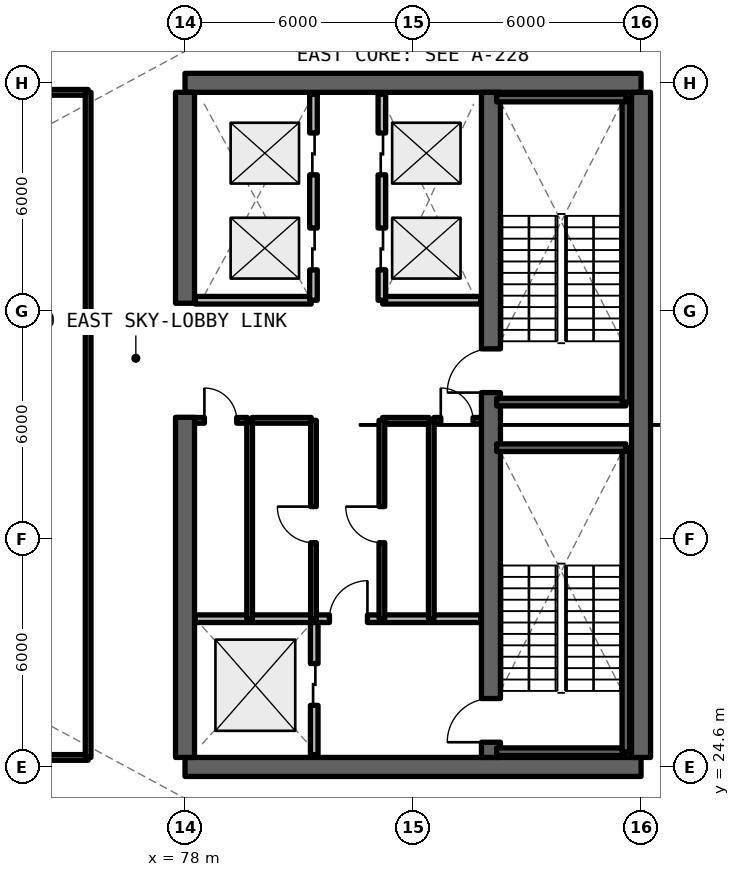
"""IFC4 building model, lengths in metres.
Left out: names, types, materials, properties, quantities, classifications, styles, units other than length and angle.
Written with IfcOpenShell. Run it as: python <this file> out.ifc"""

import sys

from ifc_helpers import new_model, si_unit, direction, frame, frame_2d, origin, place, context, subcontext, project, spatial, rectangle, extrude, element, fill, save


model = new_model("IFC4")
c1 = context("Model", 3, precision=1e-05, world=origin(), true_north=direction((0.0, 1.0)))
c2 = subcontext(c1, "Body", "Model", "MODEL_VIEW")
j1 = project(units=[si_unit("LENGTHUNIT", "METRE"), si_unit("PLANEANGLEUNIT", "RADIAN")], contexts=[c1])
p1 = place(None, origin())
s1 = spatial("IfcSite", under=j1, at=p1, CompositionType="ELEMENT")
p2 = place(p1, origin())
s2 = spatial("IfcBuilding", under=s1, at=p2, CompositionType="ELEMENT")
p3 = place(p2, frame((0.0, 0.0, 128.04)))
s3 = spatial("IfcBuildingStorey", under=s2, at=p3, CompositionType="ELEMENT", Elevation=128.04)
for number, where, z_axis, x_axis in (
    (1, (78.0, 24.6, 0.0), (0.0, 0.0, 1.0), (1.0, 0.0, 0.0)),
    (2, (90.0, 42.6, 0.0), (0.0, 0.0, 1.0), (-1.0, 0.0, 0.0)),
):
    element("IfcWall", number, at=place(p3, frame(where, z_axis=z_axis, x_axis=x_axis)), inside=s3, PredefinedType="SHEAR", context=c2, shape_type="SweptSolid", body=[
        extrude(rectangle(XDim=12.0, YDim=0.5, at=frame_2d((6.0, 0.0))), origin(), (0.0, 0.0, 1.0), 3.96),
    ])
p4 = place(p3, frame((90.0, 24.85, 0.0), z_axis=(0.0, 0.0, 1.0), x_axis=(0.0, 1.0, 0.0)))
e3 = element("IfcWall", 3, at=p4, inside=s3, PredefinedType="SHEAR", context=c2, shape_type="SweptSolid", body=[
    extrude(rectangle(XDim=17.5, YDim=0.5, at=frame_2d((8.75, 0.0))), origin(), (0.0, 0.0, 1.0), 3.96),
])
p5 = place(p3, frame((78.0, 24.85, 0.0), z_axis=(0.0, 0.0, 1.0), x_axis=(0.0, 1.0, 0.0)))
e4 = element("IfcWall", 4, at=p5, inside=s3, PredefinedType="SHEAR", context=c2, shape_type="SweptSolid", body=[
    extrude(rectangle(XDim=8.95, YDim=0.5, at=frame_2d((4.475, 0.0))), origin(), (0.0, 0.0, 1.0), 3.96),
])
p6 = place(p3, frame((78.0, 36.8, 0.0), z_axis=(0.0, 0.0, 1.0), x_axis=(0.0, 1.0, 0.0)))
e5 = element("IfcWall", 5, at=p6, inside=s3, PredefinedType="SHEAR", context=c2, shape_type="SweptSolid", body=[
    extrude(rectangle(XDim=5.55, YDim=0.5, at=frame_2d((2.775, 0.0))), origin(), (0.0, 0.0, 1.0), 3.96),
])
p7 = place(p3, frame((86.05, 24.85, 0.0), z_axis=(0.0, 0.0, 1.0), x_axis=(0.0, 1.0, 0.0)))
e6 = element("IfcWall", 6, at=p7, inside=s3, PredefinedType="SHEAR", context=c2, shape_type="SweptSolid", body=[
    extrude(rectangle(XDim=17.5, YDim=0.5, at=frame_2d((8.75, 0.0))), origin(), (0.0, 0.0, 1.0), 3.96),
])
p8 = place(p7, frame((0.4, 0.0, 0.0)))
e7 = element("IfcOpeningElement", 7, at=p8, cuts=e6, PredefinedType="OPENING", context=c2, shape_type="SweptSolid", body=[
    extrude(rectangle(XDim=1.15, YDim=2.15, at=frame_2d((0.575, 1.075))), frame((0.0, 0.26, 0.0), z_axis=(0.0, -1.0, 0.0), x_axis=(1.0, 0.0, 0.0)), (0.0, 0.0, 1.0), 0.52),
])
p9 = place(p7, frame((9.6, 0.0, 0.0)))
e8 = element("IfcOpeningElement", 8, at=p9, cuts=e6, PredefinedType="OPENING", context=c2, shape_type="SweptSolid", body=[
    extrude(rectangle(XDim=1.15, YDim=2.15, at=frame_2d((0.575, 1.075))), frame((0.0, 0.26, 0.0), z_axis=(0.0, -1.0, 0.0), x_axis=(1.0, 0.0, 0.0)), (0.0, 0.0, 1.0), 0.52),
])
p10 = place(p3, frame((81.4, 24.92, 0.0), z_axis=(0.0, 0.0, 1.0), x_axis=(0.0, 1.0, 0.0)))
e9 = element("IfcWall", 9, at=p10, inside=s3, PredefinedType="SOLIDWALL", context=c2, shape_type="SweptSolid", body=[
    extrude(rectangle(XDim=3.58, YDim=0.2, at=frame_2d((1.79, 0.0))), origin(), (0.0, 0.0, 1.0), 2.96),
])
p11 = place(p10, frame((1.3, 0.0, 0.0)))
e10 = element("IfcOpeningElement", 10, at=p11, cuts=e9, PredefinedType="OPENING", context=c2, shape_type="SweptSolid", body=[
    extrude(rectangle(XDim=1.1, YDim=2.2, at=frame_2d((0.55, 1.1))), frame((0.0, 0.11, 0.0), z_axis=(0.0, -1.0, 0.0), x_axis=(1.0, 0.0, 0.0)), (0.0, 0.0, 1.0), 0.22),
])
p12 = place(p3, frame((78.27, 28.5, 0.0), z_axis=(0.0, 0.0, 1.0), x_axis=(1.0, 0.0, 0.0)))
e11 = element("IfcWall", 11, at=p12, inside=s3, PredefinedType="SOLIDWALL", context=c2, shape_type="SweptSolid", body=[
    extrude(rectangle(XDim=7.51, YDim=0.2, at=frame_2d((3.755, 0.0))), origin(), (0.0, 0.0, 1.0), 2.96),
])
p13 = place(p12, frame((3.53, 0.0, 0.0)))
e12 = element("IfcOpeningElement", 12, at=p13, cuts=e11, PredefinedType="OPENING", context=c2, shape_type="SweptSolid", body=[
    extrude(rectangle(XDim=1.0, YDim=2.15, at=frame_2d((0.5, 1.075))), frame((0.0, 0.11, 0.0), z_axis=(0.0, -1.0, 0.0), x_axis=(1.0, 0.0, 0.0)), (0.0, 0.0, 1.0), 0.22),
])
p14 = place(p3, frame((84.48, 28.5, 0.0), z_axis=(0.0, 0.0, 1.0), x_axis=(0.0, 1.0, 0.0)))
e13 = element("IfcWall", 13, at=p14, inside=s3, PredefinedType="SOLIDWALL", context=c2, shape_type="SweptSolid", body=[
    extrude(rectangle(XDim=5.22, YDim=0.15, at=frame_2d((2.61, 0.0))), origin(), (0.0, 0.0, 1.0), 2.96),
])
p15 = place(p3, frame((84.55, 33.72, 0.0), z_axis=(0.0, 0.0, 1.0), x_axis=(1.0, 0.0, 0.0)))
e14 = element("IfcWall", 14, at=p15, inside=s3, PredefinedType="SOLIDWALL", context=c2, shape_type="SweptSolid", body=[
    extrude(rectangle(XDim=1.23, YDim=0.15, at=frame_2d((0.615, 0.0))), origin(), (0.0, 0.0, 1.0), 2.96),
])
p16 = place(p15, frame((0.18, 0.0, 0.0)))
e15 = element("IfcOpeningElement", 15, at=p16, cuts=e14, PredefinedType="OPENING", context=c2, shape_type="SweptSolid", body=[
    extrude(rectangle(XDim=0.85, YDim=2.1, at=frame_2d((0.425, 1.05))), frame((0.0, 0.085, 0.0), z_axis=(0.0, -1.0, 0.0), x_axis=(1.0, 0.0, 0.0)), (0.0, 0.0, 1.0), 0.17),
])
p17 = place(p3, frame((83.2, 33.72, 0.0), z_axis=(0.0, 0.0, 1.0), x_axis=(1.0, 0.0, 0.0)))
e16 = element("IfcWall", 16, at=p17, inside=s3, PredefinedType="SOLIDWALL", context=c2, shape_type="SweptSolid", body=[
    extrude(rectangle(XDim=1.22, YDim=0.15, at=frame_2d((0.61, 0.0))), origin(), (0.0, 0.0, 1.0), 2.96),
])
p18 = place(p3, frame((83.18, 28.5, 0.0), z_axis=(0.0, 0.0, 1.0), x_axis=(0.0, 1.0, 0.0)))
e17 = element("IfcWall", 17, at=p18, inside=s3, PredefinedType="SOLIDWALL", context=c2, shape_type="SweptSolid", body=[
    extrude(rectangle(XDim=5.22, YDim=0.15, at=frame_2d((2.61, 0.0))), origin(), (0.0, 0.0, 1.0), 2.96),
])
p19 = place(p18, frame((2.0, 0.0, 0.0)))
e18 = element("IfcOpeningElement", 18, at=p19, cuts=e17, PredefinedType="OPENING", context=c2, shape_type="SweptSolid", body=[
    extrude(rectangle(XDim=0.95, YDim=2.15, at=frame_2d((0.475, 1.075))), frame((0.0, 0.085, 0.0), z_axis=(0.0, -1.0, 0.0), x_axis=(1.0, 0.0, 0.0)), (0.0, 0.0, 1.0), 0.17),
])
p20 = place(p3, frame((79.7, 28.5, 0.0), z_axis=(0.0, 0.0, 1.0), x_axis=(0.0, 1.0, 0.0)))
e19 = element("IfcWall", 19, at=p20, inside=s3, PredefinedType="SOLIDWALL", context=c2, shape_type="SweptSolid", body=[
    extrude(rectangle(XDim=5.22, YDim=0.15, at=frame_2d((2.61, 0.0))), origin(), (0.0, 0.0, 1.0), 2.96),
])
p21 = place(p3, frame((79.76, 33.72, 0.0), z_axis=(0.0, 0.0, 1.0), x_axis=(1.0, 0.0, 0.0)))
e20 = element("IfcWall", 20, at=p21, inside=s3, PredefinedType="SOLIDWALL", context=c2, shape_type="SweptSolid", body=[
    extrude(rectangle(XDim=1.56, YDim=0.15, at=frame_2d((0.78, 0.0))), origin(), (0.0, 0.0, 1.0), 2.96),
])
p22 = place(p3, frame((78.27, 33.72, 0.0), z_axis=(0.0, 0.0, 1.0), x_axis=(1.0, 0.0, 0.0)))
e21 = element("IfcWall", 21, at=p22, inside=s3, PredefinedType="SOLIDWALL", context=c2, shape_type="SweptSolid", body=[
    extrude(rectangle(XDim=1.37, YDim=0.15, at=frame_2d((0.685, 0.0))), origin(), (0.0, 0.0, 1.0), 2.96),
])
p23 = place(p22, frame((0.24, 0.0, 0.0)))
e22 = element("IfcOpeningElement", 22, at=p23, cuts=e21, PredefinedType="OPENING", context=c2, shape_type="SweptSolid", body=[
    extrude(rectangle(XDim=0.85, YDim=2.1, at=frame_2d((0.425, 1.05))), frame((0.0, 0.085, 0.0), z_axis=(0.0, -1.0, 0.0), x_axis=(1.0, 0.0, 0.0)), (0.0, 0.0, 1.0), 0.17),
])
p24 = place(p3, frame((81.38, 28.5, 0.0), z_axis=(0.0, 0.0, 1.0), x_axis=(0.0, 1.0, 0.0)))
e23 = element("IfcWall", 23, at=p24, inside=s3, PredefinedType="SOLIDWALL", context=c2, shape_type="SweptSolid", body=[
    extrude(rectangle(XDim=5.22, YDim=0.15, at=frame_2d((2.61, 0.0))), origin(), (0.0, 0.0, 1.0), 2.96),
])
p25 = place(p24, frame((2.0, 0.0, 0.0)))
e24 = element("IfcOpeningElement", 24, at=p25, cuts=e23, PredefinedType="OPENING", context=c2, shape_type="SweptSolid", body=[
    extrude(rectangle(XDim=0.95, YDim=2.15, at=frame_2d((0.475, 1.075))), frame((0.0, 0.085, 0.0), z_axis=(0.0, -1.0, 0.0), x_axis=(1.0, 0.0, 0.0)), (0.0, 0.0, 1.0), 0.17),
])
p26 = place(p3, frame((83.2, 36.88, 0.0), z_axis=(0.0, 0.0, 1.0), x_axis=(1.0, 0.0, 0.0)))
e25 = element("IfcWall", 25, at=p26, inside=s3, PredefinedType="SOLIDWALL", context=c2, shape_type="SweptSolid", body=[
    extrude(rectangle(XDim=2.58, YDim=0.2, at=frame_2d((1.29, 0.0))), origin(), (0.0, 0.0, 1.0), 2.96),
])
p27 = place(p3, frame((83.18, 36.88, 0.0), z_axis=(0.0, 0.0, 1.0), x_axis=(0.0, 1.0, 0.0)))
e26 = element("IfcWall", 26, at=p27, inside=s3, PredefinedType="SOLIDWALL", context=c2, shape_type="SweptSolid", body=[
    extrude(rectangle(XDim=5.42, YDim=0.2, at=frame_2d((2.71, 0.0))), origin(), (0.0, 0.0, 1.0), 2.96),
])
p28 = place(p27, frame((0.8, 0.0, 0.0)))
e27 = element("IfcOpeningElement", 27, at=p28, cuts=e26, PredefinedType="OPENING", context=c2, shape_type="SweptSolid", body=[
    extrude(rectangle(XDim=1.1, YDim=2.2, at=frame_2d((0.55, 1.1))), frame((0.0, 0.11, 0.0), z_axis=(0.0, -1.0, 0.0), x_axis=(1.0, 0.0, 0.0)), (0.0, 0.0, 1.0), 0.22),
])
p29 = place(p27, frame((3.3, 0.0, 0.0)))
e28 = element("IfcOpeningElement", 28, at=p29, cuts=e26, PredefinedType="OPENING", context=c2, shape_type="SweptSolid", body=[
    extrude(rectangle(XDim=1.1, YDim=2.2, at=frame_2d((0.55, 1.1))), frame((0.0, 0.11, 0.0), z_axis=(0.0, -1.0, 0.0), x_axis=(1.0, 0.0, 0.0)), (0.0, 0.0, 1.0), 0.22),
])
p30 = place(p3, frame((78.27, 36.88, 0.0), z_axis=(0.0, 0.0, 1.0), x_axis=(1.0, 0.0, 0.0)))
e29 = element("IfcWall", 29, at=p30, inside=s3, PredefinedType="SOLIDWALL", context=c2, shape_type="SweptSolid", body=[
    extrude(rectangle(XDim=3.05, YDim=0.2, at=frame_2d((1.525, 0.0))), origin(), (0.0, 0.0, 1.0), 2.96),
])
p31 = place(p3, frame((81.38, 36.88, 0.0), z_axis=(0.0, 0.0, 1.0), x_axis=(0.0, 1.0, 0.0)))
e30 = element("IfcWall", 30, at=p31, inside=s3, PredefinedType="SOLIDWALL", context=c2, shape_type="SweptSolid", body=[
    extrude(rectangle(XDim=5.42, YDim=0.2, at=frame_2d((2.71, 0.0))), origin(), (0.0, 0.0, 1.0), 2.96),
])
p32 = place(p31, frame((0.8, 0.0, 0.0)))
e31 = element("IfcOpeningElement", 31, at=p32, cuts=e30, PredefinedType="OPENING", context=c2, shape_type="SweptSolid", body=[
    extrude(rectangle(XDim=1.1, YDim=2.2, at=frame_2d((0.55, 1.1))), frame((0.0, 0.11, 0.0), z_axis=(0.0, -1.0, 0.0), x_axis=(1.0, 0.0, 0.0)), (0.0, 0.0, 1.0), 0.22),
])
p33 = place(p31, frame((3.3, 0.0, 0.0)))
e32 = element("IfcOpeningElement", 32, at=p33, cuts=e30, PredefinedType="OPENING", context=c2, shape_type="SweptSolid", body=[
    extrude(rectangle(XDim=1.1, YDim=2.2, at=frame_2d((0.55, 1.1))), frame((0.0, 0.11, 0.0), z_axis=(0.0, -1.0, 0.0), x_axis=(1.0, 0.0, 0.0)), (0.0, 0.0, 1.0), 0.22),
])
for number, where, z_axis, x_axis in (
    (33, (38.55, 24.85, 0.0), (0.0, 0.0, 1.0), (1.0, 0.0, 0.0)),
    (34, (38.55, 42.35, 0.0), (0.0, 0.0, 1.0), (1.0, 0.0, 0.0)),
):
    element("IfcWall", number, at=place(p3, frame(where, z_axis=z_axis, x_axis=x_axis)), inside=s3, PredefinedType="SOLIDWALL", context=c2, shape_type="SweptSolid", body=[
        extrude(rectangle(XDim=36.9, YDim=0.15, at=frame_2d((18.45, 0.0))), origin(), (0.0, 0.0, 1.0), 2.96),
    ])
p34 = place(p3, frame((75.45, 24.85, 0.0), z_axis=(0.0, 0.0, 1.0), x_axis=(0.0, 1.0, 0.0)))
e35 = element("IfcWall", 35, at=p34, inside=s3, PredefinedType="SOLIDWALL", context=c2, shape_type="SweptSolid", body=[
    extrude(rectangle(XDim=17.5, YDim=0.15, at=frame_2d((8.75, 0.0))), origin(), (0.0, 0.0, 1.0), 2.96),
])
p35 = place(p3, frame((86.2, 25.0, 0.0), z_axis=(0.0, 0.0, 1.0), x_axis=(1.0, 0.0, 0.0)))
e36 = element("IfcWall", 36, at=p35, inside=s3, PredefinedType="SOLIDWALL", context=c2, shape_type="SweptSolid", body=[
    extrude(rectangle(XDim=3.4, YDim=0.2, at=frame_2d((1.7, 0.0))), origin(), (0.0, 0.0, 1.0), 3.96),
])
p36 = place(p3, frame((89.6, 25.0, 0.0), z_axis=(0.0, 0.0, 1.0), x_axis=(0.0, 1.0, 0.0)))
e37 = element("IfcWall", 37, at=p36, inside=s3, PredefinedType="SOLIDWALL", context=c2, shape_type="SweptSolid", body=[
    extrude(rectangle(XDim=8.0, YDim=0.2, at=frame_2d((4.0, 0.0))), origin(), (0.0, 0.0, 1.0), 3.96),
])
for number, where, z_axis, x_axis in (
    (38, (89.6, 33.0, 0.0), (0.0, 0.0, 1.0), (-1.0, 0.0, 0.0)),
    (39, (86.2, 34.2, 0.0), (0.0, 0.0, 1.0), (1.0, 0.0, 0.0)),
):
    element("IfcWall", number, at=place(p3, frame(where, z_axis=z_axis, x_axis=x_axis)), inside=s3, PredefinedType="SOLIDWALL", context=c2, shape_type="SweptSolid", body=[
        extrude(rectangle(XDim=3.4, YDim=0.2, at=frame_2d((1.7, 0.0))), origin(), (0.0, 0.0, 1.0), 3.96),
    ])
p37 = place(p3, frame((89.6, 34.2, 0.0), z_axis=(0.0, 0.0, 1.0), x_axis=(0.0, 1.0, 0.0)))
e40 = element("IfcWall", 40, at=p37, inside=s3, PredefinedType="SOLIDWALL", context=c2, shape_type="SweptSolid", body=[
    extrude(rectangle(XDim=8.0, YDim=0.2, at=frame_2d((4.0, 0.0))), origin(), (0.0, 0.0, 1.0), 3.96),
])
p38 = place(p3, frame((89.6, 42.2, 0.0), z_axis=(0.0, 0.0, 1.0), x_axis=(-1.0, 0.0, 0.0)))
e41 = element("IfcWall", 41, at=p38, inside=s3, PredefinedType="SOLIDWALL", context=c2, shape_type="SweptSolid", body=[
    extrude(rectangle(XDim=3.4, YDim=0.2, at=frame_2d((1.7, 0.0))), origin(), (0.0, 0.0, 1.0), 3.96),
])
p39 = place(p11, origin())
e42 = element("IfcDoor", 42, at=p39, inside=s3, OperationType="SLIDING_TO_LEFT", PredefinedType="DOOR", context=c2, shape_type="SweptSolid", body=[
    extrude(rectangle(XDim=1.1, YDim=2.2, at=frame_2d((0.55, 1.1))), frame((0.0, 0.025, 0.0), z_axis=(0.0, -1.0, 0.0), x_axis=(1.0, 0.0, 0.0)), (0.0, 0.0, 1.0), 0.05),
])
fill(e10, e42)
p40 = place(p13, origin())
e43 = element("IfcDoor", 43, at=p40, inside=s3, OperationType="SINGLE_SWING_RIGHT", PredefinedType="DOOR", context=c2, shape_type="SweptSolid", body=[
    extrude(rectangle(XDim=1.0, YDim=2.15, at=frame_2d((0.5, 1.075))), frame((0.0, 0.025, 0.0), z_axis=(0.0, -1.0, 0.0), x_axis=(1.0, 0.0, 0.0)), (0.0, 0.0, 1.0), 0.05),
])
fill(e12, e43)
p41 = place(p16, origin())
e44 = element("IfcDoor", 44, at=p41, inside=s3, OperationType="SINGLE_SWING_LEFT", PredefinedType="DOOR", context=c2, shape_type="SweptSolid", body=[
    extrude(rectangle(XDim=0.85, YDim=2.1, at=frame_2d((0.425, 1.05))), frame((0.0, 0.025, 0.0), z_axis=(0.0, -1.0, 0.0), x_axis=(1.0, 0.0, 0.0)), (0.0, 0.0, 1.0), 0.05),
])
fill(e15, e44)
p42 = place(p19, origin())
e45 = element("IfcDoor", 45, at=p42, inside=s3, OperationType="SINGLE_SWING_RIGHT", PredefinedType="DOOR", context=c2, shape_type="SweptSolid", body=[
    extrude(rectangle(XDim=0.95, YDim=2.15, at=frame_2d((0.475, 1.075))), frame((0.0, 0.025, 0.0), z_axis=(0.0, -1.0, 0.0), x_axis=(1.0, 0.0, 0.0)), (0.0, 0.0, 1.0), 0.05),
])
fill(e18, e45)
p43 = place(p23, origin())
e46 = element("IfcDoor", 46, at=p43, inside=s3, OperationType="SINGLE_SWING_LEFT", PredefinedType="DOOR", context=c2, shape_type="SweptSolid", body=[
    extrude(rectangle(XDim=0.85, YDim=2.1, at=frame_2d((0.425, 1.05))), frame((0.0, 0.025, 0.0), z_axis=(0.0, -1.0, 0.0), x_axis=(1.0, 0.0, 0.0)), (0.0, 0.0, 1.0), 0.05),
])
fill(e22, e46)
p44 = place(p25, origin())
e47 = element("IfcDoor", 47, at=p44, inside=s3, OperationType="SINGLE_SWING_RIGHT", PredefinedType="DOOR", context=c2, shape_type="SweptSolid", body=[
    extrude(rectangle(XDim=0.95, YDim=2.15, at=frame_2d((0.475, 1.075))), frame((0.0, 0.025, 0.0), z_axis=(0.0, -1.0, 0.0), x_axis=(1.0, 0.0, 0.0)), (0.0, 0.0, 1.0), 0.05),
])
fill(e24, e47)
p45 = place(p28, origin())
e48 = element("IfcDoor", 48, at=p45, inside=s3, OperationType="SLIDING_TO_LEFT", PredefinedType="DOOR", context=c2, shape_type="SweptSolid", body=[
    extrude(rectangle(XDim=1.1, YDim=2.2, at=frame_2d((0.55, 1.1))), frame((0.0, 0.025, 0.0), z_axis=(0.0, -1.0, 0.0), x_axis=(1.0, 0.0, 0.0)), (0.0, 0.0, 1.0), 0.05),
])
fill(e27, e48)
p46 = place(p29, origin())
e49 = element("IfcDoor", 49, at=p46, inside=s3, OperationType="SLIDING_TO_RIGHT", PredefinedType="DOOR", context=c2, shape_type="SweptSolid", body=[
    extrude(rectangle(XDim=1.1, YDim=2.2, at=frame_2d((0.55, 1.1))), frame((0.0, 0.025, 0.0), z_axis=(0.0, -1.0, 0.0), x_axis=(1.0, 0.0, 0.0)), (0.0, 0.0, 1.0), 0.05),
])
fill(e28, e49)
p47 = place(p32, origin())
e50 = element("IfcDoor", 50, at=p47, inside=s3, OperationType="SLIDING_TO_LEFT", PredefinedType="DOOR", context=c2, shape_type="SweptSolid", body=[
    extrude(rectangle(XDim=1.1, YDim=2.2, at=frame_2d((0.55, 1.1))), frame((0.0, 0.025, 0.0), z_axis=(0.0, -1.0, 0.0), x_axis=(1.0, 0.0, 0.0)), (0.0, 0.0, 1.0), 0.05),
])
fill(e31, e50)
p48 = place(p33, origin())
e51 = element("IfcDoor", 51, at=p48, inside=s3, OperationType="SLIDING_TO_RIGHT", PredefinedType="DOOR", context=c2, shape_type="SweptSolid", body=[
    extrude(rectangle(XDim=1.1, YDim=2.2, at=frame_2d((0.55, 1.1))), frame((0.0, 0.025, 0.0), z_axis=(0.0, -1.0, 0.0), x_axis=(1.0, 0.0, 0.0)), (0.0, 0.0, 1.0), 0.05),
])
fill(e32, e51)
p49 = place(p8, origin())
e52 = element("IfcDoor", 52, at=p49, inside=s3, OperationType="SINGLE_SWING_LEFT", PredefinedType="DOOR", context=c2, shape_type="SweptSolid", body=[
    extrude(rectangle(XDim=1.15, YDim=2.15, at=frame_2d((0.575, 1.075))), frame((0.0, 0.025, 0.0), z_axis=(0.0, -1.0, 0.0), x_axis=(1.0, 0.0, 0.0)), (0.0, 0.0, 1.0), 0.05),
])
fill(e7, e52)
p50 = place(p9, origin())
e53 = element("IfcDoor", 53, at=p50, inside=s3, OperationType="SINGLE_SWING_RIGHT", PredefinedType="DOOR", context=c2, shape_type="SweptSolid", body=[
    extrude(rectangle(XDim=1.15, YDim=2.15, at=frame_2d((0.575, 1.075))), frame((0.0, 0.025, 0.0), z_axis=(0.0, -1.0, 0.0), x_axis=(1.0, 0.0, 0.0)), (0.0, 0.0, 1.0), 0.05),
])
fill(e8, e53)
save(model, sys.argv[1])
